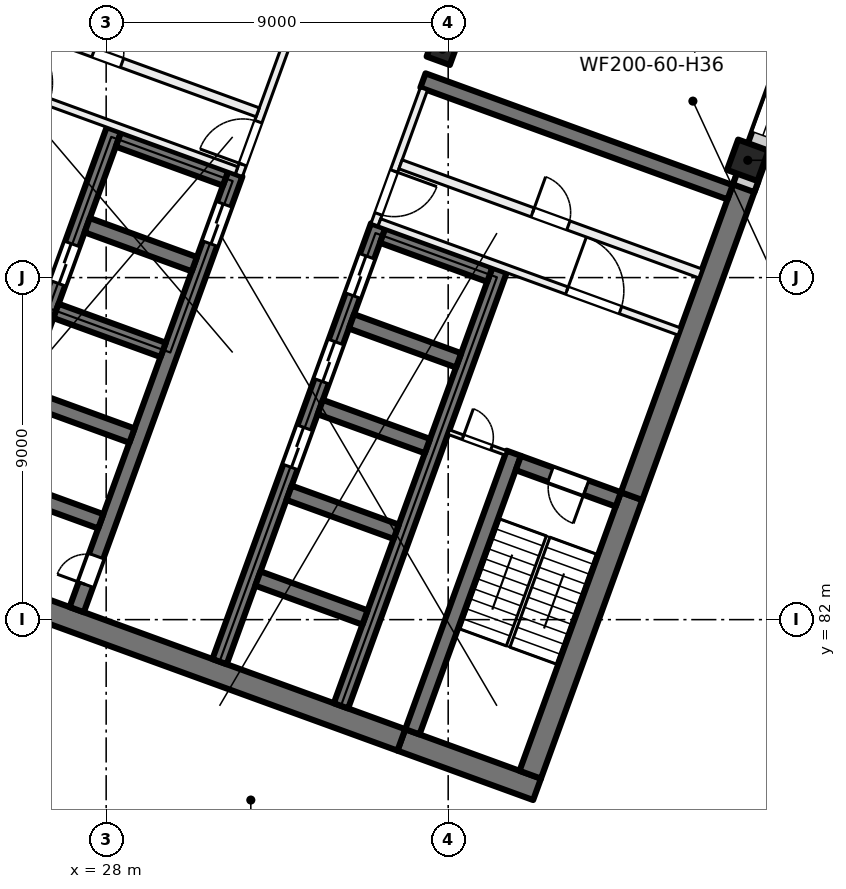
"""IFC4 building model, lengths in metres.
Left out: names, types, materials, properties, quantities, classifications, styles, units other than length and angle.
Written with IfcOpenShell. Run it as: python <this file> out.ifc"""

import sys

from ifc_helpers import new_model, si_unit, direction, frame, frame_2d, origin, origin_2d, place, context, subcontext, project, spatial, rectangle, extrude, element, fill, save


model = new_model("IFC4")
c1 = context("Model", 3, precision=1e-05, world=origin(), true_north=direction((0.0, 1.0)))
c2 = subcontext(c1, "Body", "Model", "MODEL_VIEW")
j1 = project(units=[si_unit("LENGTHUNIT", "METRE"), si_unit("PLANEANGLEUNIT", "RADIAN")], contexts=[c1])
p1 = place(None, origin())
s1 = spatial("IfcSite", under=j1, at=p1, CompositionType="ELEMENT")
p2 = place(p1, origin())
s2 = spatial("IfcBuilding", under=s1, at=p2, CompositionType="ELEMENT")
p3 = place(p2, frame((0.0, 0.0, 109.0)))
s3 = spatial("IfcBuildingStorey", under=s2, at=p3, CompositionType="ELEMENT", Elevation=109.0)
p4 = place(p3, frame((36.849, 97.011, 0.0), z_axis=(0.0, 0.0, 1.0), x_axis=(-0.342020143326, -0.939692620786, 0.0)))
e1 = element("IfcColumn", 1, at=p4, inside=s3, PredefinedType="COLUMN", context=c2, shape_type="SweptSolid", body=[
    extrude(rectangle(XDim=0.65, YDim=0.65, at=origin_2d()), origin(), (0.0, 0.0, 1.0), 4.0),
])
p5 = place(p3, frame((44.884, 94.087, 0.0), z_axis=(0.0, 0.0, 1.0), x_axis=(-0.342020143326, -0.939692620786, 0.0)))
e2 = element("IfcColumn", 2, at=p5, inside=s3, PredefinedType="COLUMN", context=c2, shape_type="SweptSolid", body=[
    extrude(rectangle(XDim=0.85, YDim=0.85, at=origin_2d()), origin(), (0.0, 0.0, 1.0), 4.0),
])
p6 = place(p3, frame((39.338, 77.535, 0.0), z_axis=(0.0, 0.0, 1.0), x_axis=(-0.939701471648, 0.341995824804, 0.0)))
e3 = element("IfcWall", 3, at=p6, inside=s3, PredefinedType="SHEAR", context=c2, shape_type="SweptSolid", body=[
    extrude(rectangle(XDim=3.8, YDim=0.6, at=frame_2d((1.9, 0.0))), origin(), (0.0, 0.0, 1.0), 4.0),
])
p7 = place(p3, frame((35.767, 78.835, 0.0), z_axis=(0.0, 0.0, 1.0), x_axis=(-0.939692894512, 0.342019391267, 0.0)))
e4 = element("IfcWall", 4, at=p7, inside=s3, PredefinedType="SHEAR", context=c2, shape_type="SweptSolid", body=[
    extrude(rectangle(XDim=14.4, YDim=0.6, at=frame_2d((7.2, 0.0))), origin(), (0.0, 0.0, 1.0), 4.0),
])
p8 = place(p3, frame((39.159, 77.92, 0.0), z_axis=(0.0, 0.0, 1.0), x_axis=(0.342016982193, 0.939693771338, 0.0)))
e5 = element("IfcWall", 5, at=p8, inside=s3, PredefinedType="SHEAR", context=c2, shape_type="SweptSolid", body=[
    extrude(rectangle(XDim=7.8, YDim=0.6, at=frame_2d((3.9, 0.0))), origin(), (0.0, 0.0, 1.0), 4.0),
])
p9 = place(p3, frame((41.827, 85.249, 0.0), z_axis=(0.0, 0.0, 1.0), x_axis=(0.342017595281, 0.939693548195, 0.0)))
e6 = element("IfcWall", 6, at=p9, inside=s3, PredefinedType="SHEAR", context=c2, shape_type="SweptSolid", body=[
    extrude(rectangle(XDim=8.925, YDim=0.6, at=frame_2d((4.462, 0.0))), origin(), (0.0, 0.0, 1.0), 4.0),
])
p10 = place(p3, frame((36.058, 79.048, 0.0), z_axis=(0.0, 0.0, 1.0), x_axis=(0.342016982193, 0.939693771338, 0.0)))
e7 = element("IfcWall", 7, at=p10, inside=s3, PredefinedType="SHEAR", context=c2, shape_type="SweptSolid", body=[
    extrude(rectangle(XDim=7.8, YDim=0.4, at=frame_2d((3.9, 0.0))), origin(), (0.0, 0.0, 1.0), 4.0),
])
p11 = place(p3, frame((41.476, 85.164, 0.0), z_axis=(0.0, 0.0, 1.0), x_axis=(-0.939678810556, 0.342058084236, 0.0)))
e8 = element("IfcWall", 8, at=p11, inside=s3, PredefinedType="SHEAR", context=c2, shape_type="SweptSolid", body=[
    extrude(rectangle(XDim=2.8, YDim=0.4, at=frame_2d((1.4, 0.0))), origin(), (0.0, 0.0, 1.0), 4.0),
])
p12 = place(p11, frame((0.9, 0.0, 0.0)))
e9 = element("IfcOpeningElement", 9, at=p12, cuts=e8, PredefinedType="OPENING", context=c2, shape_type="SweptSolid", body=[
    extrude(rectangle(XDim=1.0, YDim=2.1, at=frame_2d((0.5, 1.05))), frame((0.0, 0.21, 0.0), z_axis=(0.0, -1.0, 0.0), x_axis=(1.0, 0.0, 0.0)), (0.0, 0.0, 1.0), 0.42),
])
p13 = place(p3, frame((30.984, 80.895, 0.0), z_axis=(0.0, 0.0, 1.0), x_axis=(0.342021021735, 0.939692301071, 0.0)))
e10 = element("IfcWall", 10, at=p13, inside=s3, PredefinedType="SHEAR", context=c2, shape_type="SweptSolid", body=[
    extrude(rectangle(XDim=12.2, YDim=0.4, at=frame_2d((6.1, 0.0))), origin(), (0.0, 0.0, 1.0), 4.0),
])
p14 = place(p13, frame((5.45, 0.0, 0.0)))
e11 = element("IfcOpeningElement", 11, at=p14, cuts=e10, PredefinedType="OPENING", context=c2, shape_type="SweptSolid", body=[
    extrude(rectangle(XDim=1.1, YDim=2.1, at=frame_2d((0.55, 1.05))), frame((0.0, 0.21, 0.0), z_axis=(0.0, -1.0, 0.0), x_axis=(1.0, 0.0, 0.0)), (0.0, 0.0, 1.0), 0.42),
])
p15 = place(p13, frame((7.85, 0.0, 0.0)))
e12 = element("IfcOpeningElement", 12, at=p15, cuts=e10, PredefinedType="OPENING", context=c2, shape_type="SweptSolid", body=[
    extrude(rectangle(XDim=1.1, YDim=2.1, at=frame_2d((0.55, 1.05))), frame((0.0, 0.21, 0.0), z_axis=(0.0, -1.0, 0.0), x_axis=(1.0, 0.0, 0.0)), (0.0, 0.0, 1.0), 0.42),
])
p16 = place(p13, frame((10.25, 0.0, 0.0)))
e13 = element("IfcOpeningElement", 13, at=p16, cuts=e10, PredefinedType="OPENING", context=c2, shape_type="SweptSolid", body=[
    extrude(rectangle(XDim=1.1, YDim=2.1, at=frame_2d((0.55, 1.05))), frame((0.0, 0.21, 0.0), z_axis=(0.0, -1.0, 0.0), x_axis=(1.0, 0.0, 0.0)), (0.0, 0.0, 1.0), 0.42),
])
p17 = place(p3, frame((34.178, 79.732, 0.0), z_axis=(0.0, 0.0, 1.0), x_axis=(0.342014590177, 0.939694641948, 0.0)))
e14 = element("IfcWall", 14, at=p17, inside=s3, PredefinedType="SHEAR", context=c2, shape_type="SweptSolid", body=[
    extrude(rectangle(XDim=12.2, YDim=0.4, at=frame_2d((6.1, 0.0))), origin(), (0.0, 0.0, 1.0), 4.0),
])
for number, where, z_axis, x_axis in (
    (15, (34.812, 82.056, 0.0), (0.0, 0.0, 1.0), (-0.94, 0.342, 0.0)),
    (16, (35.632, 84.311, 0.0), (0.0, 0.0, 1.0), (-0.94, 0.342, 0.0)),
    (17, (36.453, 86.566, 0.0), (0.0, 0.0, 1.0), (-0.94, 0.342, 0.0)),
    (18, (37.274, 88.822, 0.0), (0.0, 0.0, 1.0), (-0.94, 0.342, 0.0)),
):
    element("IfcWall", number, at=place(p3, frame(where, z_axis=z_axis, x_axis=x_axis)), inside=s3, PredefinedType="SHEAR", context=c2, shape_type="SweptSolid", body=[
        extrude(rectangle(XDim=3.0, YDim=0.4, at=frame_2d((1.5, 0.0))), origin(), (0.0, 0.0, 1.0), 4.0),
    ])
p18 = place(p3, frame((38.095, 91.077, 0.0), z_axis=(0.0, 0.0, 1.0), x_axis=(-0.939676934218, 0.342063238742, 0.0)))
e19 = element("IfcWall", 19, at=p18, inside=s3, PredefinedType="SHEAR", context=c2, shape_type="SweptSolid", body=[
    extrude(rectangle(XDim=3.0, YDim=0.4, at=frame_2d((1.5, 0.0))), origin(), (0.0, 0.0, 1.0), 4.0),
])
p19 = place(p3, frame((27.225, 82.263, 0.0), z_axis=(0.0, 0.0, 1.0), x_axis=(0.342014590177, 0.939694641948, 0.0)))
e20 = element("IfcWall", 20, at=p19, inside=s3, PredefinedType="SHEAR", context=c2, shape_type="SweptSolid", body=[
    extrude(rectangle(XDim=12.2, YDim=0.4, at=frame_2d((6.1, 0.0))), origin(), (0.0, 0.0, 1.0), 4.0),
])
p20 = place(p19, frame((10.25, 0.0, 0.0)))
e21 = element("IfcOpeningElement", 21, at=p20, cuts=e20, PredefinedType="OPENING", context=c2, shape_type="SweptSolid", body=[
    extrude(rectangle(XDim=1.1, YDim=2.1, at=frame_2d((0.55, 1.05))), frame((0.0, 0.21, 0.0), z_axis=(0.0, -1.0, 0.0), x_axis=(1.0, 0.0, 0.0)), (0.0, 0.0, 1.0), 0.42),
])
p21 = place(p19, frame((0.7, 0.0, 0.0)))
e22 = element("IfcOpeningElement", 22, at=p21, cuts=e20, PredefinedType="OPENING", context=c2, shape_type="SweptSolid", body=[
    extrude(rectangle(XDim=0.8, YDim=2.1, at=frame_2d((0.4, 1.05))), frame((0.0, 0.21, 0.0), z_axis=(0.0, -1.0, 0.0), x_axis=(1.0, 0.0, 0.0)), (0.0, 0.0, 1.0), 0.42),
])
p22 = place(p3, frame((24.03, 83.426, 0.0), z_axis=(0.0, 0.0, 1.0), x_axis=(0.342014590177, 0.939694641948, 0.0)))
e23 = element("IfcWall", 23, at=p22, inside=s3, PredefinedType="SHEAR", context=c2, shape_type="SweptSolid", body=[
    extrude(rectangle(XDim=12.2, YDim=0.4, at=frame_2d((6.1, 0.0))), origin(), (0.0, 0.0, 1.0), 4.0),
])
p23 = place(p22, frame((7.9, 0.0, 0.0)))
e24 = element("IfcOpeningElement", 24, at=p23, cuts=e23, PredefinedType="OPENING", context=c2, shape_type="SweptSolid", body=[
    extrude(rectangle(XDim=1.1, YDim=2.1, at=frame_2d((0.55, 1.05))), frame((0.0, 0.21, 0.0), z_axis=(0.0, -1.0, 0.0), x_axis=(1.0, 0.0, 0.0)), (0.0, 0.0, 1.0), 0.42),
])
p24 = place(p3, frame((27.858, 84.587, 0.0), z_axis=(0.0, 0.0, 1.0), x_axis=(-0.939686455819, 0.342037080957, 0.0)))
e25 = element("IfcWall", 25, at=p24, inside=s3, PredefinedType="SHEAR", context=c2, shape_type="SweptSolid", body=[
    extrude(rectangle(XDim=3.0, YDim=0.4, at=frame_2d((1.5, 0.0))), origin(), (0.0, 0.0, 1.0), 4.0),
])
p25 = place(p3, frame((28.678, 86.842, 0.0), z_axis=(0.0, 0.0, 1.0), x_axis=(-0.939676934218, 0.342063238742, 0.0)))
e26 = element("IfcWall", 26, at=p25, inside=s3, PredefinedType="SHEAR", context=c2, shape_type="SweptSolid", body=[
    extrude(rectangle(XDim=3.0, YDim=0.4, at=frame_2d((1.5, 0.0))), origin(), (0.0, 0.0, 1.0), 4.0),
])
for number, where, z_axis, x_axis in (
    (27, (29.5, 89.097, 0.0), (0.0, 0.0, 1.0), (-0.94, 0.342, 0.0)),
    (28, (30.32, 91.353, 0.0), (0.0, 0.0, 1.0), (-0.94, 0.342, 0.0)),
    (29, (31.141, 93.608, 0.0), (0.0, 0.0, 1.0), (-0.94, 0.342, 0.0)),
):
    element("IfcWall", number, at=place(p3, frame(where, z_axis=z_axis, x_axis=x_axis)), inside=s3, PredefinedType="SHEAR", context=c2, shape_type="SweptSolid", body=[
        extrude(rectangle(XDim=3.0, YDim=0.4, at=frame_2d((1.5, 0.0))), origin(), (0.0, 0.0, 1.0), 4.0),
    ])
p26 = place(p3, frame((44.418, 93.245, 0.0), z_axis=(0.0, 0.0, 1.0), x_axis=(-0.93969060187, 0.342025690201, 0.0)))
e30 = element("IfcWall", 30, at=p26, inside=s3, PredefinedType="SHEAR", context=c2, shape_type="SweptSolid", body=[
    extrude(rectangle(XDim=8.6, YDim=0.4, at=frame_2d((4.3, 0.0))), origin(), (0.0, 0.0, 1.0), 4.0),
])
p27 = place(p3, frame((51.877, 112.862, 0.0), z_axis=(0.0, 0.0, 1.0), x_axis=(-0.342020589714, -0.939692458314, 0.0)))
e31 = element("IfcWall", 31, at=p27, inside=s3, PredefinedType="SOLIDWALL", context=c2, shape_type="SweptSolid", body=[
    extrude(rectangle(XDim=20.765, YDim=0.6, at=frame_2d((10.382, 0.0))), origin(), (0.0, 0.0, 1.0), 3.625),
])
p28 = place(p27, frame((2.785, 0.0, 0.9)))
e32 = element("IfcOpeningElement", 32, at=p28, cuts=e31, PredefinedType="OPENING", context=c2, shape_type="SweptSolid", body=[
    extrude(rectangle(XDim=3.0, YDim=2.4, at=frame_2d((1.5, 1.2))), frame((0.0, 0.31, 0.0), z_axis=(0.0, -1.0, 0.0), x_axis=(1.0, 0.0, 0.0)), (0.0, 0.0, 1.0), 0.62),
])
p29 = place(p27, frame((7.285, 0.0, 0.9)))
e33 = element("IfcOpeningElement", 33, at=p29, cuts=e31, PredefinedType="OPENING", context=c2, shape_type="SweptSolid", body=[
    extrude(rectangle(XDim=3.0, YDim=2.4, at=frame_2d((1.5, 1.2))), frame((0.0, 0.31, 0.0), z_axis=(0.0, -1.0, 0.0), x_axis=(1.0, 0.0, 0.0)), (0.0, 0.0, 1.0), 0.62),
])
p30 = place(p27, frame((11.785, 0.0, 0.9)))
e34 = element("IfcOpeningElement", 34, at=p30, cuts=e31, PredefinedType="OPENING", context=c2, shape_type="SweptSolid", body=[
    extrude(rectangle(XDim=3.0, YDim=2.4, at=frame_2d((1.5, 1.2))), frame((0.0, 0.31, 0.0), z_axis=(0.0, -1.0, 0.0), x_axis=(1.0, 0.0, 0.0)), (0.0, 0.0, 1.0), 0.62),
])
p31 = place(p27, frame((16.285, 0.0, 0.9)))
e35 = element("IfcOpeningElement", 35, at=p31, cuts=e31, PredefinedType="OPENING", context=c2, shape_type="SweptSolid", body=[
    extrude(rectangle(XDim=3.0, YDim=2.4, at=frame_2d((1.5, 1.2))), frame((0.0, 0.31, 0.0), z_axis=(0.0, -1.0, 0.0), x_axis=(1.0, 0.0, 0.0)), (0.0, 0.0, 1.0), 0.62),
])
p32 = place(p3, frame((31.491, 93.693, 0.0), z_axis=(0.0, 0.0, 1.0), x_axis=(0.341995824804, 0.939701471648, 0.0)))
e36 = element("IfcWall", 36, at=p32, inside=s3, PredefinedType="PARTITIONING", context=c2, shape_type="SweptSolid", body=[
    extrude(rectangle(XDim=3.8, YDim=0.2, at=frame_2d((1.9, 0.0))), origin(), (0.0, 0.0, 1.0), 3.625),
])
p33 = place(p32, frame((0.3, 0.0, 0.0)))
e37 = element("IfcOpeningElement", 37, at=p33, cuts=e36, PredefinedType="OPENING", context=c2, shape_type="SweptSolid", body=[
    extrude(rectangle(XDim=1.2, YDim=2.1, at=frame_2d((0.6, 1.05))), frame((0.0, 0.11, 0.0), z_axis=(0.0, -1.0, 0.0), x_axis=(1.0, 0.0, 0.0)), (0.0, 0.0, 1.0), 0.22),
])
p34 = place(p3, frame((23.538, 96.694, 0.0), z_axis=(0.0, 0.0, 1.0), x_axis=(0.939691552312, -0.342023078919, 0.0)))
e38 = element("IfcWall", 38, at=p34, inside=s3, PredefinedType="PARTITIONING", context=c2, shape_type="SweptSolid", body=[
    extrude(rectangle(XDim=8.4, YDim=0.2, at=frame_2d((4.2, 0.0))), origin(), (0.0, 0.0, 1.0), 3.625),
])
p35 = place(p34, frame((1.65, 0.0, 0.0)))
e39 = element("IfcOpeningElement", 39, at=p35, cuts=e38, PredefinedType="OPENING", context=c2, shape_type="SweptSolid", body=[
    extrude(rectangle(XDim=1.5, YDim=2.1, at=frame_2d((0.75, 1.05))), frame((0.0, 0.11, 0.0), z_axis=(0.0, -1.0, 0.0), x_axis=(1.0, 0.0, 0.0)), (0.0, 0.0, 1.0), 0.22),
])
p36 = place(p3, frame((24.094, 98.221, 0.0), z_axis=(0.0, 0.0, 1.0), x_axis=(0.939691552312, -0.342023078919, 0.0)))
e40 = element("IfcWall", 40, at=p36, inside=s3, PredefinedType="PARTITIONING", context=c2, shape_type="SweptSolid", body=[
    extrude(rectangle(XDim=8.4, YDim=0.25, at=frame_2d((4.2, 0.0))), origin(), (0.0, 0.0, 1.0), 3.625),
])
p37 = place(p36, frame((3.8, 0.0, 0.0)))
e41 = element("IfcOpeningElement", 41, at=p37, cuts=e40, PredefinedType="OPENING", context=c2, shape_type="SweptSolid", body=[
    extrude(rectangle(XDim=0.8, YDim=2.1, at=frame_2d((0.4, 1.05))), frame((0.0, 0.135, 0.0), z_axis=(0.0, -1.0, 0.0), x_axis=(1.0, 0.0, 0.0)), (0.0, 0.0, 1.0), 0.27),
])
p38 = place(p3, frame((36.362, 95.964, 0.0), z_axis=(0.0, 0.0, 1.0), x_axis=(-0.341995824804, -0.939701471648, 0.0)))
e42 = element("IfcWall", 42, at=p38, inside=s3, PredefinedType="PARTITIONING", context=c2, shape_type="SweptSolid", body=[
    extrude(rectangle(XDim=3.8, YDim=0.2, at=frame_2d((1.9, 0.0))), origin(), (0.0, 0.0, 1.0), 3.625),
])
p39 = place(p38, frame((2.3, 0.0, 0.0)))
e43 = element("IfcOpeningElement", 43, at=p39, cuts=e42, PredefinedType="OPENING", context=c2, shape_type="SweptSolid", body=[
    extrude(rectangle(XDim=1.2, YDim=2.1, at=frame_2d((0.6, 1.05))), frame((0.0, 0.11, 0.0), z_axis=(0.0, -1.0, 0.0), x_axis=(1.0, 0.0, 0.0)), (0.0, 0.0, 1.0), 0.22),
])
p40 = place(p3, frame((35.19, 92.453, 0.0), z_axis=(0.0, 0.0, 1.0), x_axis=(0.939691552312, -0.342023078919, 0.0)))
e44 = element("IfcWall", 44, at=p40, inside=s3, PredefinedType="PARTITIONING", context=c2, shape_type="SweptSolid", body=[
    extrude(rectangle(XDim=8.4, YDim=0.2, at=frame_2d((4.2, 0.0))), origin(), (0.0, 0.0, 1.0), 3.625),
])
p41 = place(p40, frame((5.25, 0.0, 0.0)))
e45 = element("IfcOpeningElement", 45, at=p41, cuts=e44, PredefinedType="OPENING", context=c2, shape_type="SweptSolid", body=[
    extrude(rectangle(XDim=1.5, YDim=2.1, at=frame_2d((0.75, 1.05))), frame((0.0, 0.11, 0.0), z_axis=(0.0, -1.0, 0.0), x_axis=(1.0, 0.0, 0.0)), (0.0, 0.0, 1.0), 0.22),
])
p42 = place(p3, frame((35.746, 93.98, 0.0), z_axis=(0.0, 0.0, 1.0), x_axis=(0.939691552312, -0.342023078919, 0.0)))
e46 = element("IfcWall", 46, at=p42, inside=s3, PredefinedType="PARTITIONING", context=c2, shape_type="SweptSolid", body=[
    extrude(rectangle(XDim=8.4, YDim=0.25, at=frame_2d((4.2, 0.0))), origin(), (0.0, 0.0, 1.0), 3.625),
])
p43 = place(p42, frame((3.7, 0.0, 0.0)))
e47 = element("IfcOpeningElement", 47, at=p43, cuts=e46, PredefinedType="OPENING", context=c2, shape_type="SweptSolid", body=[
    extrude(rectangle(XDim=1.0, YDim=2.1, at=frame_2d((0.5, 1.05))), frame((0.0, 0.135, 0.0), z_axis=(0.0, -1.0, 0.0), x_axis=(1.0, 0.0, 0.0)), (0.0, 0.0, 1.0), 0.27),
])
p44 = place(p3, frame((37.013, 86.935, 0.0), z_axis=(0.0, 0.0, 1.0), x_axis=(0.939659694648, -0.342110593602, 0.0)))
e48 = element("IfcWall", 48, at=p44, inside=s3, PredefinedType="PARTITIONING", context=c2, shape_type="SweptSolid", body=[
    extrude(rectangle(XDim=1.6, YDim=0.125, at=frame_2d((0.8, 0.0))), origin(), (0.0, 0.0, 1.0), 3.625),
])
p45 = place(p44, frame((0.4, 0.0, 0.0)))
e49 = element("IfcOpeningElement", 49, at=p45, cuts=e48, PredefinedType="OPENING", context=c2, shape_type="SweptSolid", body=[
    extrude(rectangle(XDim=0.8, YDim=2.1, at=frame_2d((0.4, 1.05))), frame((0.0, 0.073, 0.0), z_axis=(0.0, -1.0, 0.0), x_axis=(1.0, 0.0, 0.0)), (0.0, 0.0, 1.0), 0.145),
])
p46 = place(p31, origin())
e50 = element("IfcWindow", 50, at=p46, inside=s3, PartitioningType="SINGLE_PANEL", PredefinedType="WINDOW", context=c2, shape_type="SweptSolid", body=[
    extrude(rectangle(XDim=3.0, YDim=2.4, at=frame_2d((1.5, 1.2))), frame((0.0, 0.03, 0.0), z_axis=(0.0, -1.0, 0.0), x_axis=(1.0, 0.0, 0.0)), (0.0, 0.0, 1.0), 0.06),
])
fill(e35, e50)
p47 = place(p20, origin())
e51 = element("IfcDoor", 51, at=p47, inside=s3, OperationType="DOUBLE_DOOR_SLIDING", PredefinedType="DOOR", context=c2, shape_type="SweptSolid", body=[
    extrude(rectangle(XDim=1.1, YDim=2.1, at=frame_2d((0.55, 1.05))), frame((0.0, 0.025, 0.0), z_axis=(0.0, -1.0, 0.0), x_axis=(1.0, 0.0, 0.0)), (0.0, 0.0, 1.0), 0.05),
])
fill(e21, e51)
p48 = place(p14, origin())
e52 = element("IfcDoor", 52, at=p48, inside=s3, OperationType="DOUBLE_DOOR_SLIDING", PredefinedType="DOOR", context=c2, shape_type="SweptSolid", body=[
    extrude(rectangle(XDim=1.1, YDim=2.1, at=frame_2d((0.55, 1.05))), frame((0.0, 0.025, 0.0), z_axis=(0.0, -1.0, 0.0), x_axis=(1.0, 0.0, 0.0)), (0.0, 0.0, 1.0), 0.05),
])
fill(e11, e52)
p49 = place(p15, origin())
e53 = element("IfcDoor", 53, at=p49, inside=s3, OperationType="DOUBLE_DOOR_SLIDING", PredefinedType="DOOR", context=c2, shape_type="SweptSolid", body=[
    extrude(rectangle(XDim=1.1, YDim=2.1, at=frame_2d((0.55, 1.05))), frame((0.0, 0.025, 0.0), z_axis=(0.0, -1.0, 0.0), x_axis=(1.0, 0.0, 0.0)), (0.0, 0.0, 1.0), 0.05),
])
fill(e12, e53)
p50 = place(p16, origin())
e54 = element("IfcDoor", 54, at=p50, inside=s3, OperationType="DOUBLE_DOOR_SLIDING", PredefinedType="DOOR", context=c2, shape_type="SweptSolid", body=[
    extrude(rectangle(XDim=1.1, YDim=2.1, at=frame_2d((0.55, 1.05))), frame((0.0, 0.025, 0.0), z_axis=(0.0, -1.0, 0.0), x_axis=(1.0, 0.0, 0.0)), (0.0, 0.0, 1.0), 0.05),
])
fill(e13, e54)
p51 = place(p21, origin())
e55 = element("IfcDoor", 55, at=p51, inside=s3, OperationType="SINGLE_SWING_LEFT", PredefinedType="DOOR", context=c2, shape_type="SweptSolid", body=[
    extrude(rectangle(XDim=0.8, YDim=2.1, at=frame_2d((0.4, 1.05))), frame((0.0, 0.025, 0.0), z_axis=(0.0, -1.0, 0.0), x_axis=(1.0, 0.0, 0.0)), (0.0, 0.0, 1.0), 0.05),
])
fill(e22, e55)
p52 = place(p33, origin())
e56 = element("IfcDoor", 56, at=p52, inside=s3, OperationType="DOUBLE_DOOR_SINGLE_SWING", PredefinedType="DOOR", context=c2, shape_type="SweptSolid", body=[
    extrude(rectangle(XDim=1.2, YDim=2.1, at=frame_2d((0.6, 1.05))), frame((0.0, 0.025, 0.0), z_axis=(0.0, -1.0, 0.0), x_axis=(1.0, 0.0, 0.0)), (0.0, 0.0, 1.0), 0.05),
])
fill(e37, e56)
p53 = place(p37, origin())
e57 = element("IfcDoor", 57, at=p53, inside=s3, OperationType="SINGLE_SWING_LEFT", PredefinedType="DOOR", context=c2, shape_type="SweptSolid", body=[
    extrude(rectangle(XDim=0.8, YDim=2.1, at=frame_2d((0.4, 1.05))), frame((0.0, 0.025, 0.0), z_axis=(0.0, -1.0, 0.0), x_axis=(1.0, 0.0, 0.0)), (0.0, 0.0, 1.0), 0.05),
])
fill(e41, e57)
p54 = place(p39, origin())
e58 = element("IfcDoor", 58, at=p54, inside=s3, OperationType="DOUBLE_DOOR_SINGLE_SWING", PredefinedType="DOOR", context=c2, shape_type="SweptSolid", body=[
    extrude(rectangle(XDim=1.2, YDim=2.1, at=frame_2d((0.6, 1.05))), frame((0.0, 0.025, 0.0), z_axis=(0.0, -1.0, 0.0), x_axis=(1.0, 0.0, 0.0)), (0.0, 0.0, 1.0), 0.05),
])
fill(e43, e58)
p55 = place(p41, origin())
e59 = element("IfcDoor", 59, at=p55, inside=s3, OperationType="DOUBLE_DOOR_SINGLE_SWING", PredefinedType="DOOR", context=c2, shape_type="SweptSolid", body=[
    extrude(rectangle(XDim=1.5, YDim=2.1, at=frame_2d((0.75, 1.05))), frame((0.0, 0.025, 0.0), z_axis=(0.0, -1.0, 0.0), x_axis=(1.0, 0.0, 0.0)), (0.0, 0.0, 1.0), 0.05),
])
fill(e45, e59)
p56 = place(p12, origin())
e60 = element("IfcDoor", 60, at=p56, inside=s3, OperationType="SINGLE_SWING_RIGHT", PredefinedType="DOOR", context=c2, shape_type="SweptSolid", body=[
    extrude(rectangle(XDim=1.0, YDim=2.1, at=frame_2d((0.5, 1.05))), frame((0.0, 0.025, 0.0), z_axis=(0.0, -1.0, 0.0), x_axis=(1.0, 0.0, 0.0)), (0.0, 0.0, 1.0), 0.05),
])
fill(e9, e60)
p57 = place(p45, origin())
e61 = element("IfcDoor", 61, at=p57, inside=s3, OperationType="SINGLE_SWING_LEFT", PredefinedType="DOOR", context=c2, shape_type="SweptSolid", body=[
    extrude(rectangle(XDim=0.8, YDim=2.1, at=frame_2d((0.4, 1.05))), frame((0.0, 0.025, 0.0), z_axis=(0.0, -1.0, 0.0), x_axis=(1.0, 0.0, 0.0)), (0.0, 0.0, 1.0), 0.05),
])
fill(e49, e61)
p58 = place(p43, origin())
e62 = element("IfcDoor", 62, at=p58, inside=s3, OperationType="SINGLE_SWING_RIGHT", PredefinedType="DOOR", context=c2, shape_type="SweptSolid", body=[
    extrude(rectangle(XDim=1.0, YDim=2.1, at=frame_2d((0.5, 1.05))), frame((0.0, 0.025, 0.0), z_axis=(0.0, -1.0, 0.0), x_axis=(1.0, 0.0, 0.0)), (0.0, 0.0, 1.0), 0.05),
])
fill(e47, e62)
p59 = place(p23, origin())
e63 = element("IfcDoor", 63, at=p59, inside=s3, OperationType="DOUBLE_DOOR_SLIDING", PredefinedType="DOOR", context=c2, shape_type="SweptSolid", body=[
    extrude(rectangle(XDim=1.1, YDim=2.1, at=frame_2d((0.55, 1.05))), frame((0.0, 0.025, 0.0), z_axis=(0.0, -1.0, 0.0), x_axis=(1.0, 0.0, 0.0)), (0.0, 0.0, 1.0), 0.05),
])
fill(e24, e63)
save(model, sys.argv[1])
